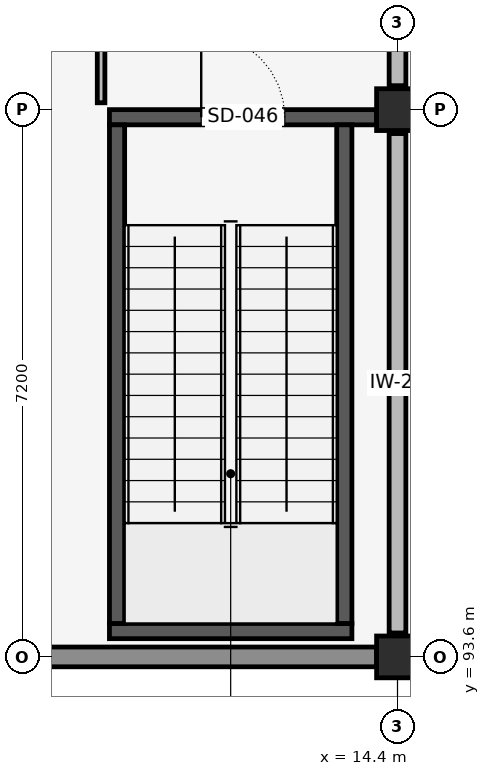
"""IFC4 building model, lengths in metres.
Left out: names, types, materials, properties, quantities, classifications, styles, units other than length and angle.
Written with IfcOpenShell. Run it as: python <this file> out.ifc"""

import sys

from ifc_helpers import new_model, si_unit, direction, frame, frame_2d, origin, origin_2d, place, context, subcontext, project, spatial, rectangle, extrude, element, fill, save


model = new_model("IFC4")
c1 = context("Model", 3, precision=1e-05, world=origin(), true_north=direction((0.0, 1.0)))
c2 = subcontext(c1, "Body", "Model", "MODEL_VIEW")
j1 = project(units=[si_unit("LENGTHUNIT", "METRE"), si_unit("PLANEANGLEUNIT", "RADIAN")], contexts=[c1])
p1 = place(None, origin())
s1 = spatial("IfcSite", under=j1, at=p1, CompositionType="ELEMENT")
p2 = place(p1, origin())
s2 = spatial("IfcBuilding", under=s1, at=p2, CompositionType="ELEMENT")
p3 = place(p2, origin())
s3 = spatial("IfcBuildingStorey", under=s2, at=p3, CompositionType="ELEMENT", Elevation=0.0)
for number, where, z_axis, x_axis in (
    (1, (14.4, 93.6, 0.0), (0.0, 0.0, 1.0), (1.0, 0.0, 0.0)),
    (2, (14.4, 100.8, 0.0), (0.0, 0.0, 1.0), (1.0, 0.0, 0.0)),
):
    element("IfcColumn", number, at=place(p3, frame(where, z_axis=z_axis, x_axis=x_axis)), inside=s3, PredefinedType="COLUMN", context=c2, shape_type="SweptSolid", body=[
        extrude(rectangle(XDim=0.55, YDim=0.55, at=origin_2d()), origin(), (0.0, 0.0, 1.0), 5.4),
    ])
p4 = place(p3, frame((10.61, 93.94, 0.0), z_axis=(0.0, 0.0, 1.0), x_axis=(1.0, 0.0, 0.0)))
e3 = element("IfcWall", 3, at=p4, inside=s3, PredefinedType="SHEAR", context=c2, shape_type="SweptSolid", body=[
    extrude(rectangle(XDim=3.19, YDim=0.2, at=frame_2d((1.595, 0.0))), origin(), (0.0, 0.0, 1.0), 5.18),
])
p5 = place(p3, frame((10.61, 100.7, 0.0), z_axis=(0.0, 0.0, 1.0), x_axis=(1.0, 0.0, 0.0)))
e4 = element("IfcWall", 4, at=p5, inside=s3, PredefinedType="SHEAR", context=c2, shape_type="SweptSolid", body=[
    extrude(rectangle(XDim=3.515, YDim=0.2, at=frame_2d((1.757, 0.0))), origin(), (0.0, 0.0, 1.0), 5.18),
])
p6 = place(p5, frame((1.208, 0.0, 0.0)))
e5 = element("IfcOpeningElement", 5, at=p6, cuts=e4, PredefinedType="OPENING", context=c2, shape_type="SweptSolid", body=[
    extrude(rectangle(XDim=1.1, YDim=2.15, at=frame_2d((0.55, 1.075))), frame((0.0, 0.112, 0.0), z_axis=(0.0, -1.0, 0.0), x_axis=(1.0, 0.0, 0.0)), (0.0, 0.0, 1.0), 0.224),
])
for number, where, z_axis, x_axis in (
    (6, (10.71, 94.04, 0.0), (0.0, 0.0, 1.0), (0.0, 1.0, 0.0)),
    (7, (13.7, 94.04, 0.0), (0.0, 0.0, 1.0), (0.0, 1.0, 0.0)),
):
    element("IfcWall", number, at=place(p3, frame(where, z_axis=z_axis, x_axis=x_axis)), inside=s3, PredefinedType="SHEAR", context=c2, shape_type="SweptSolid", body=[
        extrude(rectangle(XDim=6.56, YDim=0.2, at=frame_2d((3.28, 0.0))), origin(), (0.0, 0.0, 1.0), 5.18),
    ])
p7 = place(p3, frame((7.475, 93.6, 0.0), z_axis=(0.0, 0.0, 1.0), x_axis=(1.0, 0.0, 0.0)))
e8 = element("IfcWall", 8, at=p7, inside=s3, PredefinedType="STANDARD", context=c2, shape_type="SweptSolid", body=[
    extrude(rectangle(XDim=6.65, YDim=0.26, at=frame_2d((3.325, 0.0))), origin(), (0.0, 0.0, 1.0), 4.47),
])
p8 = place(p3, frame((14.4, 93.915, 0.0), z_axis=(0.0, 0.0, 1.0), x_axis=(0.0, 1.0, 0.0)))
e9 = element("IfcWall", 9, at=p8, inside=s3, PredefinedType="STANDARD", context=c2, shape_type="SweptSolid", body=[
    extrude(rectangle(XDim=6.57, YDim=0.22, at=frame_2d((3.285, 0.0))), origin(), (0.0, 0.0, 1.0), 4.518),
])
p9 = place(p3, frame((14.4, 101.115, 0.0), z_axis=(0.0, 0.0, 1.0), x_axis=(0.0, 1.0, 0.0)))
e10 = element("IfcWall", 10, at=p9, inside=s3, PredefinedType="STANDARD", context=c2, shape_type="SweptSolid", body=[
    extrude(rectangle(XDim=6.57, YDim=0.22, at=frame_2d((3.285, 0.0))), origin(), (0.0, 0.0, 1.0), 4.568),
])
p10 = place(p9, frame((2.785, 0.0, 0.0)))
e11 = element("IfcOpeningElement", 11, at=p10, cuts=e10, PredefinedType="OPENING", context=c2, shape_type="SweptSolid", body=[
    extrude(rectangle(XDim=1.0, YDim=2.15, at=frame_2d((0.5, 1.075))), frame((0.0, 0.122, 0.0), z_axis=(0.0, -1.0, 0.0), x_axis=(1.0, 0.0, 0.0)), (0.0, 0.0, 1.0), 0.244),
])
p11 = place(p3, frame((10.5, 100.89, 0.0), z_axis=(0.0, 0.0, 1.0), x_axis=(0.0, 1.0, 0.0)))
e12 = element("IfcWall", 12, at=p11, inside=s3, PredefinedType="PARTITIONING", context=c2, shape_type="SweptSolid", body=[
    extrude(rectangle(XDim=3.09, YDim=0.1, at=frame_2d((1.545, 0.0))), origin(), (0.0, 0.0, 1.0), 5.12),
])
p12 = place(p6, origin())
e13 = element("IfcDoor", 13, at=p12, inside=s3, OperationType="SINGLE_SWING_LEFT", PredefinedType="DOOR", context=c2, shape_type="SweptSolid", body=[
    extrude(rectangle(XDim=1.1, YDim=2.15, at=frame_2d((0.55, 1.075))), frame((0.0, 0.025, 0.0), z_axis=(0.0, -1.0, 0.0), x_axis=(1.0, 0.0, 0.0)), (0.0, 0.0, 1.0), 0.05),
])
fill(e5, e13)
save(model, sys.argv[1])
